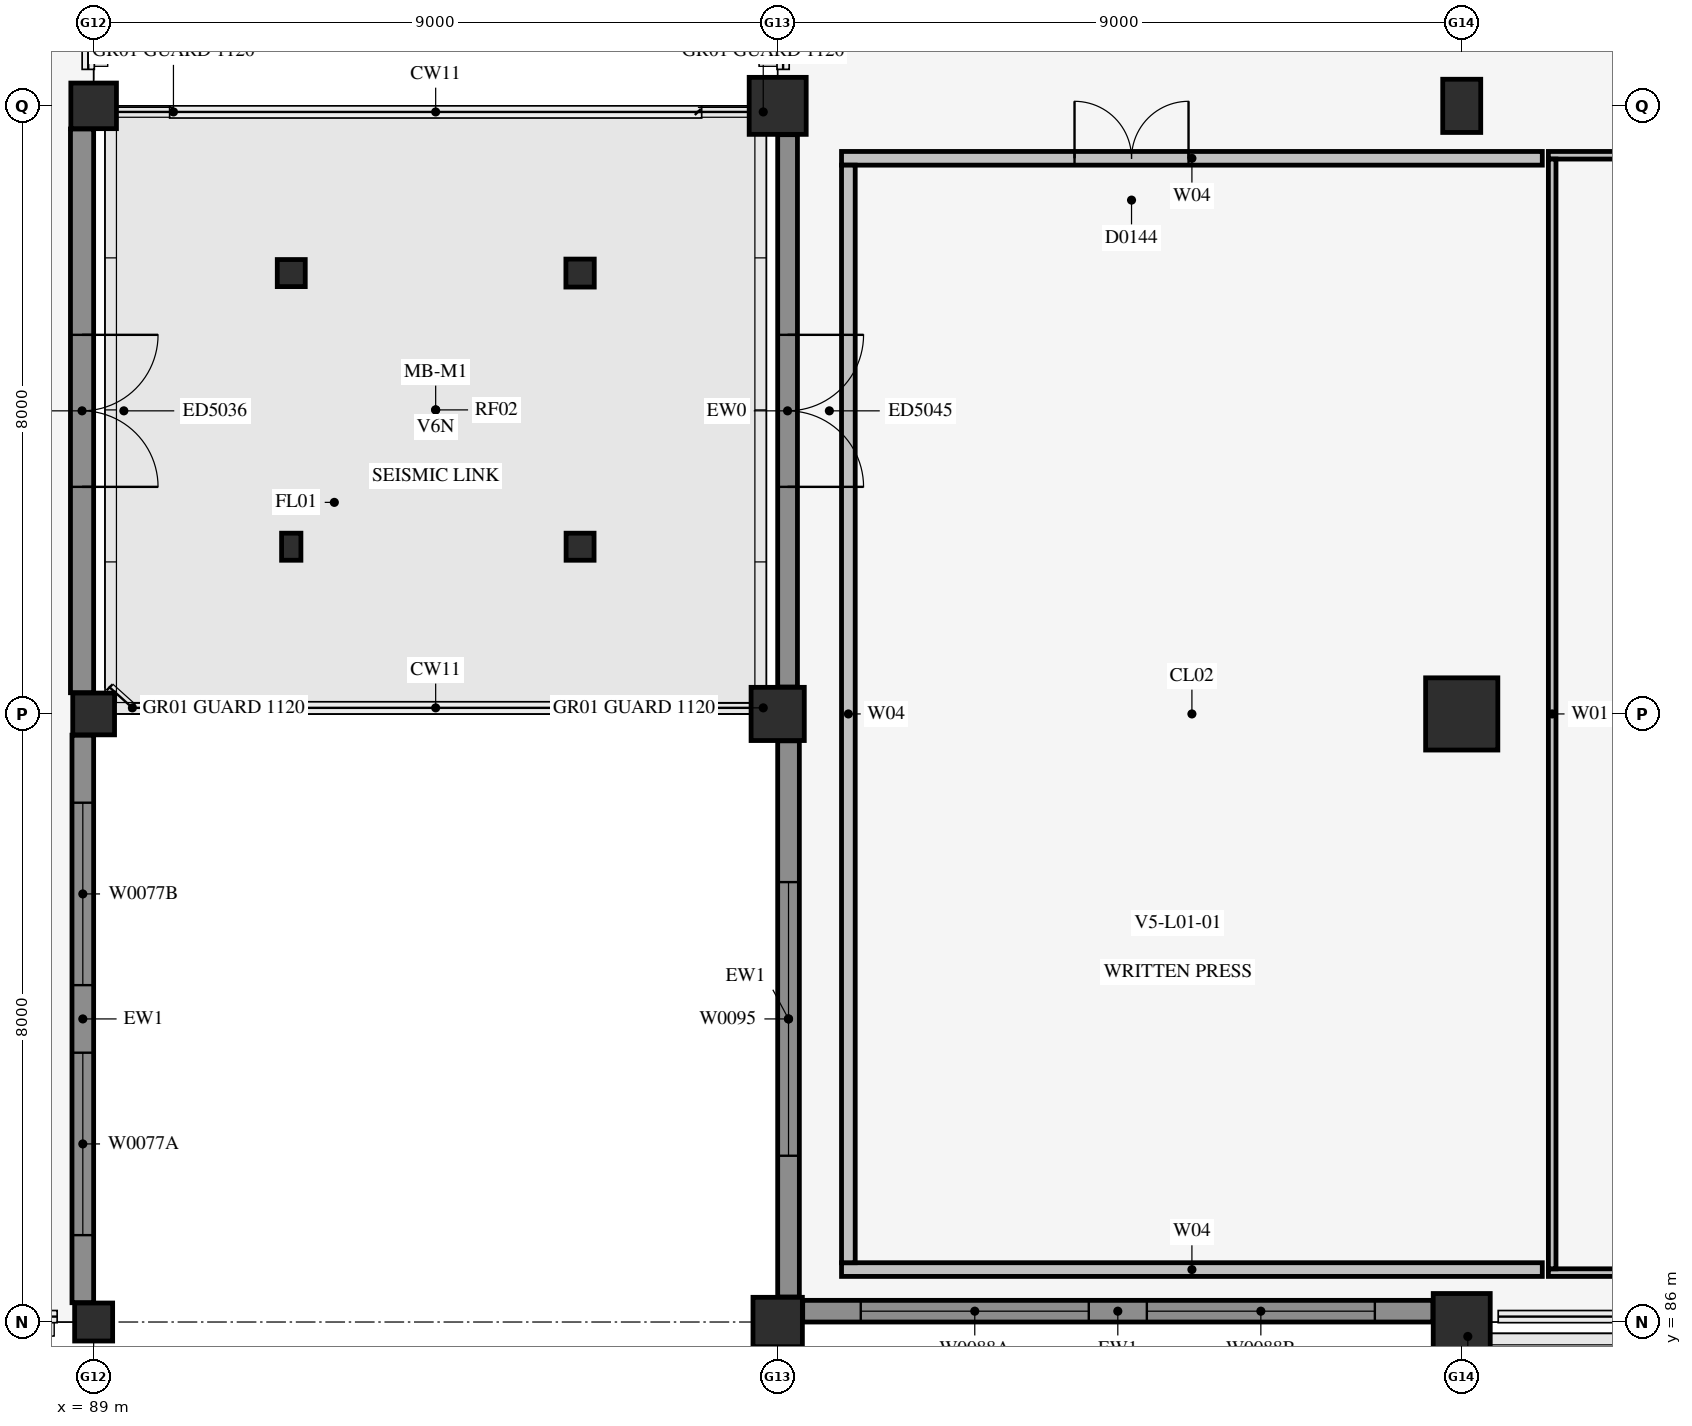
"""IFC4 building model, lengths in metres.
Left out: names, types, materials, properties, quantities, classifications, styles, units other than length and angle.
Written with IfcOpenShell. Run it as: python <this file> out.ifc"""

import sys

from ifc_helpers import new_model, si_unit, direction, frame, frame_2d, origin, origin_2d, place, context, subcontext, project, spatial, rectangle, i_section, extrude, element, fill, save


model = new_model("IFC4")
c1 = context("Model", 3, precision=1e-05, world=origin(), true_north=direction((0.0, 1.0)))
c2 = subcontext(c1, "Body", "Model", "MODEL_VIEW")
j1 = project(units=[si_unit("LENGTHUNIT", "METRE"), si_unit("PLANEANGLEUNIT", "RADIAN")], contexts=[c1])
p1 = place(None, origin())
s1 = spatial("IfcSite", under=j1, at=p1, CompositionType="ELEMENT")
p2 = place(p1, origin())
s2 = spatial("IfcBuilding", under=s1, at=p2, CompositionType="ELEMENT")
p3 = place(p2, frame((0.0, 0.0, 5.4)))
s3 = spatial("IfcBuildingStorey", under=s2, at=p3, CompositionType="ELEMENT", Elevation=5.4)
p4 = place(p3, frame((89.0, 86.0, 0.0), z_axis=(0.0, 0.0, 1.0), x_axis=(1.0, 0.0, 0.0)))
e1 = element("IfcColumn", 1, at=p4, inside=s3, PredefinedType="COLUMN", context=c2, shape_type="SweptSolid", body=[
    extrude(rectangle(XDim=0.5, YDim=0.5, at=origin_2d()), origin(), (0.0, 0.0, 1.0), 4.5),
])
p5 = place(p3, frame((89.0, 94.0, 0.0), z_axis=(0.0, 0.0, 1.0), x_axis=(1.0, 0.0, 0.0)))
e2 = element("IfcColumn", 2, at=p5, inside=s3, PredefinedType="COLUMN", context=c2, shape_type="SweptSolid", body=[
    extrude(rectangle(XDim=0.55, YDim=0.55, at=origin_2d()), origin(), (0.0, 0.0, 1.0), 4.5),
])
p6 = place(p3, frame((89.0, 102.0, 0.0), z_axis=(0.0, 0.0, 1.0), x_axis=(1.0, 0.0, 0.0)))
e3 = element("IfcColumn", 3, at=p6, inside=s3, PredefinedType="COLUMN", context=c2, shape_type="SweptSolid", body=[
    extrude(rectangle(XDim=0.6, YDim=0.6, at=origin_2d()), origin(), (0.0, 0.0, 1.0), 4.5),
])
p7 = place(p3, frame((98.0, 86.0, 0.0), z_axis=(0.0, 0.0, 1.0), x_axis=(1.0, 0.0, 0.0)))
e4 = element("IfcColumn", 4, at=p7, inside=s3, PredefinedType="COLUMN", context=c2, shape_type="SweptSolid", body=[
    extrude(rectangle(XDim=0.65, YDim=0.65, at=origin_2d()), origin(), (0.0, 0.0, 1.0), 4.8),
])
p8 = place(p3, frame((98.0, 94.0, 0.0), z_axis=(0.0, 0.0, 1.0), x_axis=(1.0, 0.0, 0.0)))
e5 = element("IfcColumn", 5, at=p8, inside=s3, PredefinedType="COLUMN", context=c2, shape_type="SweptSolid", body=[
    extrude(rectangle(XDim=0.7, YDim=0.7, at=origin_2d()), origin(), (0.0, 0.0, 1.0), 4.8),
])
for number, where, z_axis, x_axis in (
    (6, (98.0, 102.0, 0.0), (0.0, 0.0, 1.0), (1.0, 0.0, 0.0)),
    (7, (107.0, 86.0, 0.0), (0.0, 0.0, 1.0), (1.0, 0.0, 0.0)),
):
    element("IfcColumn", number, at=place(p3, frame(where, z_axis=z_axis, x_axis=x_axis)), inside=s3, PredefinedType="COLUMN", context=c2, shape_type="SweptSolid", body=[
        extrude(rectangle(XDim=0.75, YDim=0.75, at=origin_2d()), origin(), (0.0, 0.0, 1.0), 4.8),
    ])
p9 = place(p3, frame((107.0, 94.0, 0.0), z_axis=(0.0, 0.0, 1.0), x_axis=(1.0, 0.0, 0.0)))
e8 = element("IfcColumn", 8, at=p9, inside=s3, PredefinedType="COLUMN", context=c2, shape_type="SweptSolid", body=[
    extrude(rectangle(XDim=0.95, YDim=0.95, at=origin_2d()), origin(), (0.0, 0.0, 1.0), 4.8),
])
p10 = place(p3, frame((107.0, 102.0, 0.0), z_axis=(0.0, 0.0, 1.0), x_axis=(1.0, 0.0, 0.0)))
e9 = element("IfcColumn", 9, at=p10, inside=s3, PredefinedType="COLUMN", context=c2, shape_type="SweptSolid", body=[
    extrude(rectangle(XDim=0.5, YDim=0.7, at=origin_2d()), origin(), (0.0, 0.0, 1.0), 4.8),
])
p11 = place(p3, frame((91.6, 96.2, 0.0), z_axis=(0.0, 0.0, 1.0), x_axis=(1.0, 0.0, 0.0)))
e10 = element("IfcColumn", 10, at=p11, inside=s3, PredefinedType="COLUMN", context=c2, shape_type="SweptSolid", body=[
    extrude(i_section(OverallWidth=0.254, OverallDepth=0.356, WebThickness=0.011, FlangeThickness=0.018, FilletRadius=0.014, at=origin_2d()), origin(), (0.0, 0.0, 1.0), 4.24),
])
for number, where, z_axis, x_axis in (
    (11, (91.6, 99.8, 0.0), (0.0, 0.0, 1.0), (1.0, 0.0, 0.0)),
    (12, (95.4, 96.2, 0.0), (0.0, 0.0, 1.0), (1.0, 0.0, 0.0)),
):
    element("IfcColumn", number, at=place(p3, frame(where, z_axis=z_axis, x_axis=x_axis)), inside=s3, PredefinedType="COLUMN", context=c2, shape_type="SweptSolid", body=[
        extrude(i_section(OverallWidth=0.368, OverallDepth=0.356, WebThickness=0.011, FlangeThickness=0.018, FilletRadius=0.014, at=origin_2d()), origin(), (0.0, 0.0, 1.0), 4.24),
    ])
p12 = place(p3, frame((95.4, 99.8, 0.0), z_axis=(0.0, 0.0, 1.0), x_axis=(1.0, 0.0, 0.0)))
e13 = element("IfcColumn", 13, at=p12, inside=s3, PredefinedType="COLUMN", context=c2, shape_type="SweptSolid", body=[
    extrude(i_section(OverallWidth=0.373, OverallDepth=0.368, WebThickness=0.015, FlangeThickness=0.024, FilletRadius=0.014, at=origin_2d()), origin(), (0.0, 0.0, 1.0), 4.24),
])
p13 = place(p3, frame((98.84, 86.69, 0.0), z_axis=(0.0, 0.0, 1.0), x_axis=(1.0, 0.0, 0.0)))
e14 = element("IfcWall", 14, at=p13, inside=s3, PredefinedType="PARTITIONING", context=c2, shape_type="SweptSolid", body=[
    extrude(rectangle(XDim=9.22, YDim=0.18, at=frame_2d((4.61, 0.0))), origin(), (0.0, 0.0, 1.0), 4.545),
])
p14 = place(p3, frame((98.84, 101.31, 0.0), z_axis=(0.0, 0.0, 1.0), x_axis=(1.0, 0.0, 0.0)))
e15 = element("IfcWall", 15, at=p14, inside=s3, PredefinedType="PARTITIONING", context=c2, shape_type="SweptSolid", body=[
    extrude(rectangle(XDim=9.22, YDim=0.18, at=frame_2d((4.61, 0.0))), origin(), (0.0, 0.0, 1.0), 4.545),
])
p15 = place(p14, frame((3.066, 0.0, 0.0)))
e16 = element("IfcOpeningElement", 16, at=p15, cuts=e15, PredefinedType="OPENING", context=c2, shape_type="SweptSolid", body=[
    extrude(rectangle(XDim=1.5, YDim=2.3, at=frame_2d((0.75, 1.15))), frame((0.0, 0.102, 0.0), z_axis=(0.0, -1.0, 0.0), x_axis=(1.0, 0.0, 0.0)), (0.0, 0.0, 1.0), 0.204),
])
p16 = place(p3, frame((98.93, 86.78, 0.0), z_axis=(0.0, 0.0, 1.0), x_axis=(0.0, 1.0, 0.0)))
e17 = element("IfcWall", 17, at=p16, inside=s3, PredefinedType="PARTITIONING", context=c2, shape_type="SweptSolid", body=[
    extrude(rectangle(XDim=14.44, YDim=0.18, at=frame_2d((7.22, 0.0))), origin(), (0.0, 0.0, 1.0), 4.545),
])
p17 = place(p3, frame((108.14, 86.65, 0.0), z_axis=(0.0, 0.0, 1.0), x_axis=(1.0, 0.0, 0.0)))
e18 = element("IfcWall", 18, at=p17, inside=s3, PredefinedType="PARTITIONING", context=c2, shape_type="SweptSolid", body=[
    extrude(rectangle(XDim=9.22, YDim=0.1, at=frame_2d((4.61, 0.0))), origin(), (0.0, 0.0, 1.0), 4.545),
])
p18 = place(p3, frame((108.14, 101.35, 0.0), z_axis=(0.0, 0.0, 1.0), x_axis=(1.0, 0.0, 0.0)))
e19 = element("IfcWall", 19, at=p18, inside=s3, PredefinedType="PARTITIONING", context=c2, shape_type="SweptSolid", body=[
    extrude(rectangle(XDim=9.22, YDim=0.1, at=frame_2d((4.61, 0.0))), origin(), (0.0, 0.0, 1.0), 4.545),
])
p19 = place(p18, frame((3.275, 0.0, 0.0)))
e20 = element("IfcOpeningElement", 20, at=p19, cuts=e19, PredefinedType="OPENING", context=c2, shape_type="SweptSolid", body=[
    extrude(rectangle(XDim=0.95, YDim=2.15, at=frame_2d((0.475, 1.075))), frame((0.0, 0.062, 0.0), z_axis=(0.0, -1.0, 0.0), x_axis=(1.0, 0.0, 0.0)), (0.0, 0.0, 1.0), 0.124),
])
p20 = place(p3, frame((108.19, 86.7, 0.0), z_axis=(0.0, 0.0, 1.0), x_axis=(0.0, 1.0, 0.0)))
e21 = element("IfcWall", 21, at=p20, inside=s3, PredefinedType="PARTITIONING", context=c2, shape_type="SweptSolid", body=[
    extrude(rectangle(XDim=14.6, YDim=0.1, at=frame_2d((7.3, 0.0))), origin(), (0.0, 0.0, 1.0), 4.545),
])
p21 = place(p3, frame((88.857, 86.254, 0.0), z_axis=(0.0, 0.0, 1.0), x_axis=(0.0, 1.0, 0.0)))
e22 = element("IfcWall", 22, at=p21, inside=s3, PredefinedType="SOLIDWALL", context=c2, shape_type="SweptSolid", body=[
    extrude(rectangle(XDim=7.467, YDim=0.285, at=frame_2d((3.733, 0.0))), origin(), (0.0, 0.0, 1.0), 3.858),
])
p22 = place(p21, frame((0.889, 0.0, 0.95)))
e23 = element("IfcOpeningElement", 23, at=p22, cuts=e22, PredefinedType="OPENING", context=c2, shape_type="SweptSolid", body=[
    extrude(rectangle(XDim=2.4, YDim=2.1, at=frame_2d((1.2, 1.05))), frame((0.0, 0.154, 0.0), z_axis=(0.0, -1.0, 0.0), x_axis=(1.0, 0.0, 0.0)), (0.0, 0.0, 1.0), 0.309),
])
p23 = place(p21, frame((4.178, 0.0, 0.95)))
e24 = element("IfcOpeningElement", 24, at=p23, cuts=e22, PredefinedType="OPENING", context=c2, shape_type="SweptSolid", body=[
    extrude(rectangle(XDim=2.4, YDim=2.1, at=frame_2d((1.2, 1.05))), frame((0.0, 0.154, 0.0), z_axis=(0.0, -1.0, 0.0), x_axis=(1.0, 0.0, 0.0)), (0.0, 0.0, 1.0), 0.309),
])
p24 = place(p3, frame((88.847, 94.279, 0.0), z_axis=(0.0, 0.0, 1.0), x_axis=(0.0, 1.0, 0.0)))
e25 = element("IfcWall", 25, at=p24, inside=s3, PredefinedType="SOLIDWALL", context=c2, shape_type="SweptSolid", body=[
    extrude(rectangle(XDim=7.417, YDim=0.305, at=frame_2d((3.708, 0.0))), origin(), (0.0, 0.0, 1.0), 4.057),
])
p25 = place(p24, frame((2.708, 0.0, 0.0)))
e26 = element("IfcOpeningElement", 26, at=p25, cuts=e25, PredefinedType="OPENING", context=c2, shape_type="SweptSolid", body=[
    extrude(rectangle(XDim=2.0, YDim=2.4, at=frame_2d((1.0, 1.2))), frame((0.0, 0.165, 0.0), z_axis=(0.0, -1.0, 0.0), x_axis=(1.0, 0.0, 0.0)), (0.0, 0.0, 1.0), 0.329),
])
p26 = place(p3, frame((98.329, 86.143, 0.0), z_axis=(0.0, 0.0, 1.0), x_axis=(1.0, 0.0, 0.0)))
e27 = element("IfcWall", 27, at=p26, inside=s3, PredefinedType="SOLIDWALL", context=c2, shape_type="SweptSolid", body=[
    extrude(rectangle(XDim=8.292, YDim=0.285, at=frame_2d((4.146, 0.0))), origin(), (0.0, 0.0, 1.0), 4.07),
])
p27 = place(p26, frame((0.764, 0.0, 0.95)))
e28 = element("IfcOpeningElement", 28, at=p27, cuts=e27, PredefinedType="OPENING", context=c2, shape_type="SweptSolid", body=[
    extrude(rectangle(XDim=3.0, YDim=1.5, at=frame_2d((1.5, 0.75))), frame((0.0, 0.154, 0.0), z_axis=(0.0, -1.0, 0.0), x_axis=(1.0, 0.0, 0.0)), (0.0, 0.0, 1.0), 0.309),
])
p28 = place(p26, frame((4.528, 0.0, 0.95)))
e29 = element("IfcOpeningElement", 29, at=p28, cuts=e27, PredefinedType="OPENING", context=c2, shape_type="SweptSolid", body=[
    extrude(rectangle(XDim=3.0, YDim=1.5, at=frame_2d((1.5, 0.75))), frame((0.0, 0.154, 0.0), z_axis=(0.0, -1.0, 0.0), x_axis=(1.0, 0.0, 0.0)), (0.0, 0.0, 1.0), 0.309),
])
p29 = place(p3, frame((98.143, 86.329, 0.0), z_axis=(0.0, 0.0, 1.0), x_axis=(0.0, 1.0, 0.0)))
e30 = element("IfcWall", 30, at=p29, inside=s3, PredefinedType="SOLIDWALL", context=c2, shape_type="SweptSolid", body=[
    extrude(rectangle(XDim=7.317, YDim=0.285, at=frame_2d((3.658, 0.0))), origin(), (0.0, 0.0, 1.0), 3.994),
])
p30 = place(p29, frame((1.858, 0.0, 0.95)))
e31 = element("IfcOpeningElement", 31, at=p30, cuts=e30, PredefinedType="OPENING", context=c2, shape_type="SweptSolid", body=[
    extrude(rectangle(XDim=3.6, YDim=1.8, at=frame_2d((1.8, 0.9))), frame((0.0, 0.154, 0.0), z_axis=(0.0, -1.0, 0.0), x_axis=(1.0, 0.0, 0.0)), (0.0, 0.0, 1.0), 0.309),
])
p31 = place(p3, frame((98.13, 94.354, 0.0), z_axis=(0.0, 0.0, 1.0), x_axis=(0.0, 1.0, 0.0)))
e32 = element("IfcWall", 32, at=p31, inside=s3, PredefinedType="SOLIDWALL", context=c2, shape_type="SweptSolid", body=[
    extrude(rectangle(XDim=7.267, YDim=0.26, at=frame_2d((3.634, 0.0))), origin(), (0.0, 0.0, 1.0), 3.918),
])
p32 = place(p31, frame((2.634, 0.0, 0.0)))
e33 = element("IfcOpeningElement", 33, at=p32, cuts=e32, PredefinedType="OPENING", context=c2, shape_type="SweptSolid", body=[
    extrude(rectangle(XDim=2.0, YDim=2.4, at=frame_2d((1.0, 1.2))), frame((0.0, 0.142, 0.0), z_axis=(0.0, -1.0, 0.0), x_axis=(1.0, 0.0, 0.0)), (0.0, 0.0, 1.0), 0.284),
])
p33 = place(p15, frame((1.5, 0.0, 0.0), z_axis=(0.0, 0.0, 1.0), x_axis=(-1.0, 0.0, 0.0)))
e34 = element("IfcDoor", 34, at=p33, inside=s3, OperationType="DOUBLE_DOOR_SINGLE_SWING", PredefinedType="DOOR", context=c2, shape_type="SweptSolid", body=[
    extrude(rectangle(XDim=1.5, YDim=2.3, at=frame_2d((0.75, 1.15))), frame((0.0, 0.025, 0.0), z_axis=(0.0, -1.0, 0.0), x_axis=(1.0, 0.0, 0.0)), (0.0, 0.0, 1.0), 0.05),
])
fill(e16, e34)
p34 = place(p22, origin())
e35 = element("IfcWindow", 35, at=p34, inside=s3, PartitioningType="SINGLE_PANEL", PredefinedType="WINDOW", context=c2, shape_type="SweptSolid", body=[
    extrude(rectangle(XDim=2.4, YDim=2.1, at=frame_2d((1.2, 1.05))), frame((0.0, 0.03, 0.0), z_axis=(0.0, -1.0, 0.0), x_axis=(1.0, 0.0, 0.0)), (0.0, 0.0, 1.0), 0.06),
])
fill(e23, e35)
p35 = place(p23, origin())
e36 = element("IfcWindow", 36, at=p35, inside=s3, PartitioningType="SINGLE_PANEL", PredefinedType="WINDOW", context=c2, shape_type="SweptSolid", body=[
    extrude(rectangle(XDim=2.4, YDim=2.1, at=frame_2d((1.2, 1.05))), frame((0.0, 0.03, 0.0), z_axis=(0.0, -1.0, 0.0), x_axis=(1.0, 0.0, 0.0)), (0.0, 0.0, 1.0), 0.06),
])
fill(e24, e36)
p36 = place(p25, frame((2.0, 0.0, 0.0), z_axis=(0.0, 0.0, 1.0), x_axis=(-1.0, 0.0, 0.0)))
e37 = element("IfcDoor", 37, at=p36, inside=s3, OperationType="DOUBLE_DOOR_SINGLE_SWING", PredefinedType="DOOR", context=c2, shape_type="SweptSolid", body=[
    extrude(rectangle(XDim=2.0, YDim=2.4, at=frame_2d((1.0, 1.2))), frame((0.0, 0.025, 0.0), z_axis=(0.0, -1.0, 0.0), x_axis=(1.0, 0.0, 0.0)), (0.0, 0.0, 1.0), 0.05),
])
fill(e26, e37)
p37 = place(p27, origin())
e38 = element("IfcWindow", 38, at=p37, inside=s3, PartitioningType="SINGLE_PANEL", PredefinedType="WINDOW", context=c2, shape_type="SweptSolid", body=[
    extrude(rectangle(XDim=3.0, YDim=1.5, at=frame_2d((1.5, 0.75))), frame((0.0, 0.03, 0.0), z_axis=(0.0, -1.0, 0.0), x_axis=(1.0, 0.0, 0.0)), (0.0, 0.0, 1.0), 0.06),
])
fill(e28, e38)
p38 = place(p28, origin())
e39 = element("IfcWindow", 39, at=p38, inside=s3, PartitioningType="SINGLE_PANEL", PredefinedType="WINDOW", context=c2, shape_type="SweptSolid", body=[
    extrude(rectangle(XDim=3.0, YDim=1.5, at=frame_2d((1.5, 0.75))), frame((0.0, 0.03, 0.0), z_axis=(0.0, -1.0, 0.0), x_axis=(1.0, 0.0, 0.0)), (0.0, 0.0, 1.0), 0.06),
])
fill(e29, e39)
p39 = place(p30, origin())
e40 = element("IfcWindow", 40, at=p39, inside=s3, PartitioningType="SINGLE_PANEL", PredefinedType="WINDOW", context=c2, shape_type="SweptSolid", body=[
    extrude(rectangle(XDim=3.6, YDim=1.8, at=frame_2d((1.8, 0.9))), frame((0.0, 0.03, 0.0), z_axis=(0.0, -1.0, 0.0), x_axis=(1.0, 0.0, 0.0)), (0.0, 0.0, 1.0), 0.06),
])
fill(e31, e40)
p40 = place(p32, origin())
e41 = element("IfcDoor", 41, at=p40, inside=s3, OperationType="DOUBLE_DOOR_SINGLE_SWING", PredefinedType="DOOR", context=c2, shape_type="SweptSolid", body=[
    extrude(rectangle(XDim=2.0, YDim=2.4, at=frame_2d((1.0, 1.2))), frame((0.0, 0.025, 0.0), z_axis=(0.0, -1.0, 0.0), x_axis=(1.0, 0.0, 0.0)), (0.0, 0.0, 1.0), 0.05),
])
fill(e33, e41)
save(model, sys.argv[1])
